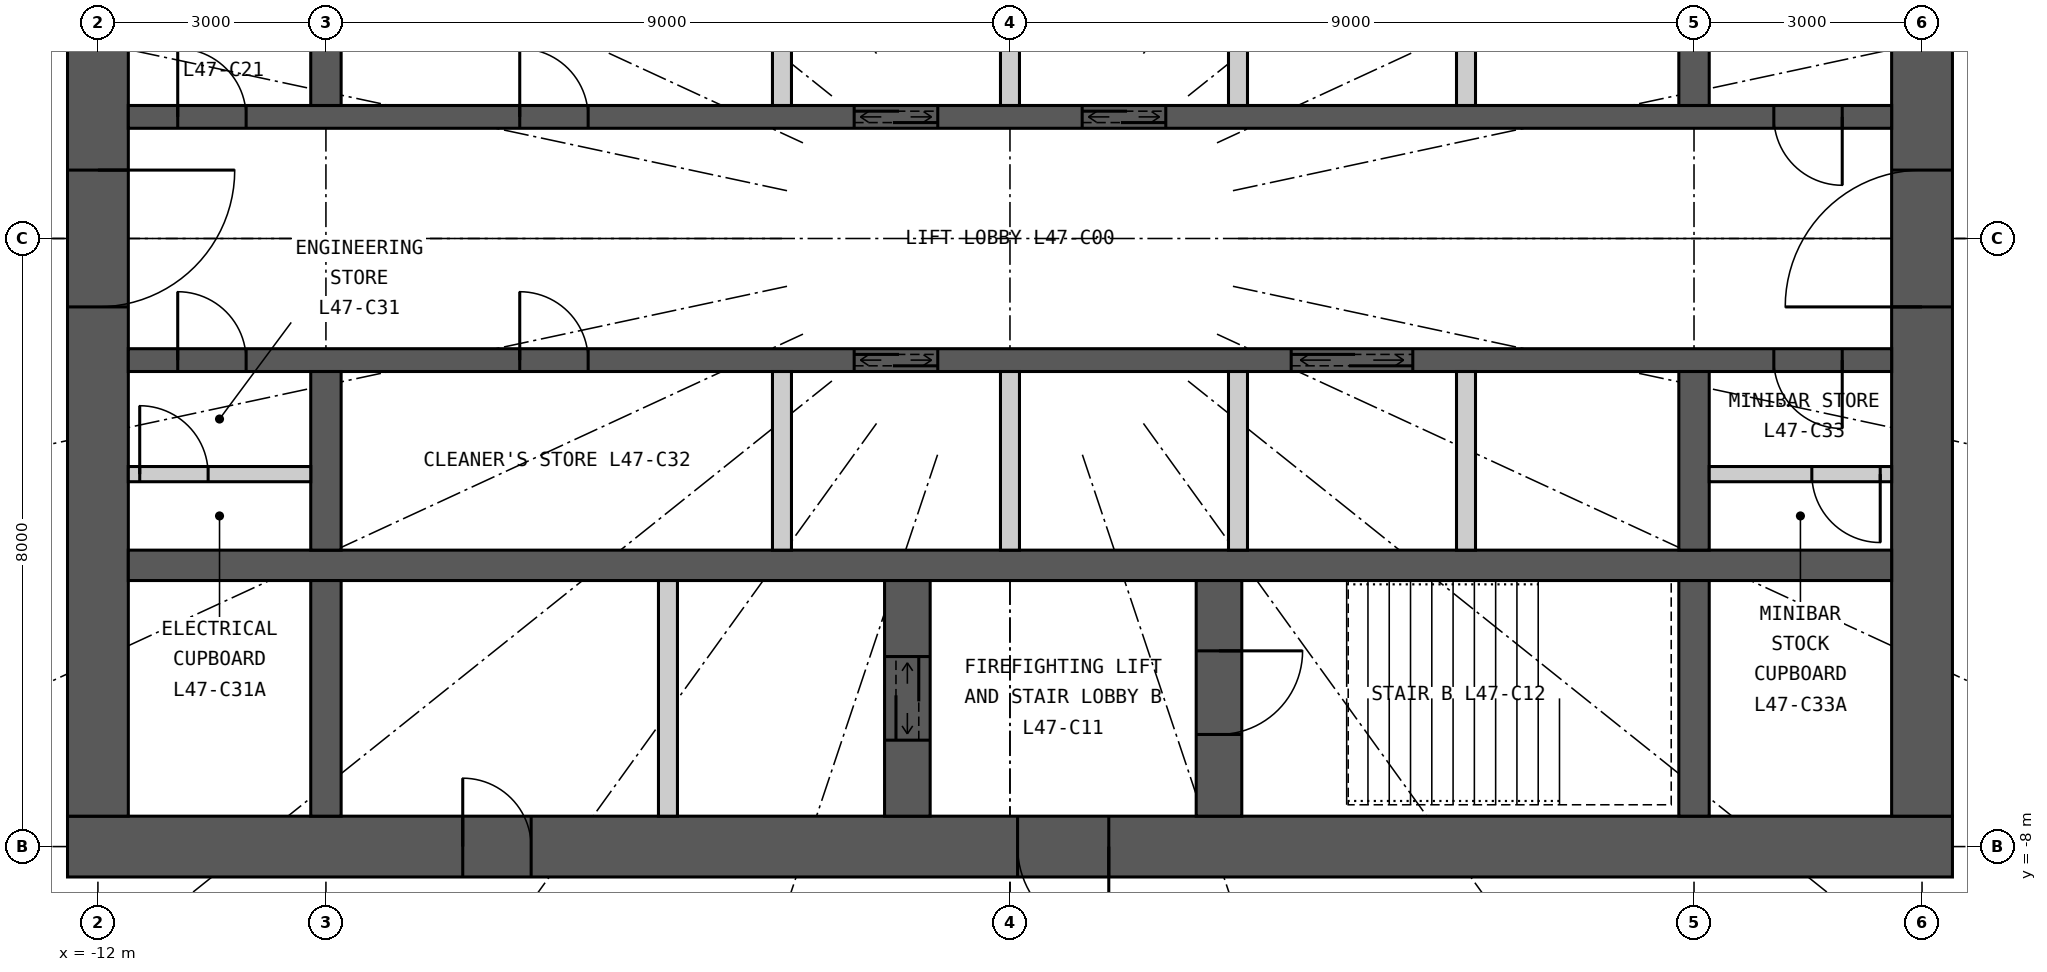
"""IFC4 building model, lengths in metres.
Left out: names, types, materials, properties, quantities, classifications, styles, units other than length and angle.
Written with IfcOpenShell. Run it as: python <this file> out.ifc"""

import sys

from ifc_helpers import new_model, si_unit, direction, frame, frame_2d, origin, place, context, subcontext, project, spatial, rectangle, extrude, element, fill, save


model = new_model("IFC4")
c1 = context("Model", 3, precision=1e-05, world=origin(), true_north=direction((0.0, 1.0)))
c2 = subcontext(c1, "Body", "Model", "MODEL_VIEW")
j1 = project(units=[si_unit("LENGTHUNIT", "METRE"), si_unit("PLANEANGLEUNIT", "RADIAN")], contexts=[c1])
p1 = place(None, origin())
s1 = spatial("IfcSite", under=j1, at=p1, CompositionType="ELEMENT")
p2 = place(p1, origin())
s2 = spatial("IfcBuilding", under=s1, at=p2, CompositionType="ELEMENT")
p3 = place(p2, frame((0.0, 0.0, 176.4)))
s3 = spatial("IfcBuildingStorey", under=s2, at=p3, CompositionType="ELEMENT", Elevation=176.4)
p4 = place(p3, frame((12.4, -8.0, 0.0), z_axis=(0.0, 0.0, 1.0), x_axis=(-1.0, 0.0, 0.0)))
e1 = element("IfcWall", 1, at=p4, inside=s3, PredefinedType="SHEAR", context=c2, shape_type="SweptSolid", body=[
    extrude(rectangle(XDim=24.8, YDim=0.8, at=frame_2d((12.4, 0.0))), origin(), (0.0, 0.0, 1.0), 3.3),
])
p5 = place(p4, frame((11.1, 0.0, 0.0)))
e2 = element("IfcOpeningElement", 2, at=p5, cuts=e1, PredefinedType="OPENING", context=c2, shape_type="SweptSolid", body=[
    extrude(rectangle(XDim=1.2, YDim=2.2, at=frame_2d((0.6, 1.1))), frame((0.0, 0.41, 0.0), z_axis=(0.0, -1.0, 0.0), x_axis=(1.0, 0.0, 0.0)), (0.0, 0.0, 1.0), 0.82),
])
p6 = place(p4, frame((18.7, 0.0, 0.0)))
e3 = element("IfcOpeningElement", 3, at=p6, cuts=e1, PredefinedType="OPENING", context=c2, shape_type="SweptSolid", body=[
    extrude(rectangle(XDim=0.9, YDim=2.2, at=frame_2d((0.45, 1.1))), frame((0.0, 0.41, 0.0), z_axis=(0.0, -1.0, 0.0), x_axis=(1.0, 0.0, 0.0)), (0.0, 0.0, 1.0), 0.82),
])
p7 = place(p3, frame((12.0, -7.6, 0.0), z_axis=(0.0, 0.0, 1.0), x_axis=(0.0, 1.0, 0.0)))
e4 = element("IfcWall", 4, at=p7, inside=s3, PredefinedType="SHEAR", context=c2, shape_type="SweptSolid", body=[
    extrude(rectangle(XDim=15.2, YDim=0.8, at=frame_2d((7.6, 0.0))), origin(), (0.0, 0.0, 1.0), 3.3),
])
p8 = place(p7, frame((6.7, 0.0, 0.0)))
e5 = element("IfcOpeningElement", 5, at=p8, cuts=e4, PredefinedType="OPENING", context=c2, shape_type="SweptSolid", body=[
    extrude(rectangle(XDim=1.8, YDim=2.2, at=frame_2d((0.9, 1.1))), frame((0.0, 0.41, 0.0), z_axis=(0.0, -1.0, 0.0), x_axis=(1.0, 0.0, 0.0)), (0.0, 0.0, 1.0), 0.82),
])
p9 = place(p3, frame((-12.0, 7.6, 0.0), z_axis=(0.0, 0.0, 1.0), x_axis=(0.0, -1.0, 0.0)))
e6 = element("IfcWall", 6, at=p9, inside=s3, PredefinedType="SHEAR", context=c2, shape_type="SweptSolid", body=[
    extrude(rectangle(XDim=15.2, YDim=0.8, at=frame_2d((7.6, 0.0))), origin(), (0.0, 0.0, 1.0), 3.3),
])
p10 = place(p9, frame((6.7, 0.0, 0.0)))
e7 = element("IfcOpeningElement", 7, at=p10, cuts=e6, PredefinedType="OPENING", context=c2, shape_type="SweptSolid", body=[
    extrude(rectangle(XDim=1.8, YDim=2.2, at=frame_2d((0.9, 1.1))), frame((0.0, 0.41, 0.0), z_axis=(0.0, -1.0, 0.0), x_axis=(1.0, 0.0, 0.0)), (0.0, 0.0, 1.0), 0.82),
])
p11 = place(p3, frame((-11.6, 1.6, 0.0), z_axis=(0.0, 0.0, 1.0), x_axis=(1.0, 0.0, 0.0)))
e8 = element("IfcWall", 8, at=p11, inside=s3, PredefinedType="SHEAR", context=c2, shape_type="SweptSolid", body=[
    extrude(rectangle(XDim=23.2, YDim=0.3, at=frame_2d((11.6, 0.0))), origin(), (0.0, 0.0, 1.0), 3.3),
])
p12 = place(p11, frame((9.55, 0.0, 0.0)))
e9 = element("IfcOpeningElement", 9, at=p12, cuts=e8, PredefinedType="OPENING", context=c2, shape_type="SweptSolid", body=[
    extrude(rectangle(XDim=1.1, YDim=2.2, at=frame_2d((0.55, 1.1))), frame((0.0, 0.16, 0.0), z_axis=(0.0, -1.0, 0.0), x_axis=(1.0, 0.0, 0.0)), (0.0, 0.0, 1.0), 0.32),
])
p13 = place(p11, frame((12.55, 0.0, 0.0)))
e10 = element("IfcOpeningElement", 10, at=p13, cuts=e8, PredefinedType="OPENING", context=c2, shape_type="SweptSolid", body=[
    extrude(rectangle(XDim=1.1, YDim=2.2, at=frame_2d((0.55, 1.1))), frame((0.0, 0.16, 0.0), z_axis=(0.0, -1.0, 0.0), x_axis=(1.0, 0.0, 0.0)), (0.0, 0.0, 1.0), 0.32),
])
p14 = place(p11, frame((0.65, 0.0, 0.0)))
e11 = element("IfcOpeningElement", 11, at=p14, cuts=e8, PredefinedType="OPENING", context=c2, shape_type="SweptSolid", body=[
    extrude(rectangle(XDim=0.9, YDim=2.2, at=frame_2d((0.45, 1.1))), frame((0.0, 0.16, 0.0), z_axis=(0.0, -1.0, 0.0), x_axis=(1.0, 0.0, 0.0)), (0.0, 0.0, 1.0), 0.32),
])
p15 = place(p11, frame((5.15, 0.0, 0.0)))
e12 = element("IfcOpeningElement", 12, at=p15, cuts=e8, PredefinedType="OPENING", context=c2, shape_type="SweptSolid", body=[
    extrude(rectangle(XDim=0.9, YDim=2.2, at=frame_2d((0.45, 1.1))), frame((0.0, 0.16, 0.0), z_axis=(0.0, -1.0, 0.0), x_axis=(1.0, 0.0, 0.0)), (0.0, 0.0, 1.0), 0.32),
])
p16 = place(p11, frame((21.65, 0.0, 0.0)))
e13 = element("IfcOpeningElement", 13, at=p16, cuts=e8, PredefinedType="OPENING", context=c2, shape_type="SweptSolid", body=[
    extrude(rectangle(XDim=0.9, YDim=2.2, at=frame_2d((0.45, 1.1))), frame((0.0, 0.16, 0.0), z_axis=(0.0, -1.0, 0.0), x_axis=(1.0, 0.0, 0.0)), (0.0, 0.0, 1.0), 0.32),
])
p17 = place(p3, frame((-11.6, -4.3, 0.0), z_axis=(0.0, 0.0, 1.0), x_axis=(1.0, 0.0, 0.0)))
e14 = element("IfcWall", 14, at=p17, inside=s3, PredefinedType="SHEAR", context=c2, shape_type="SweptSolid", body=[
    extrude(rectangle(XDim=23.2, YDim=0.4, at=frame_2d((11.6, 0.0))), origin(), (0.0, 0.0, 1.0), 3.3),
])
p18 = place(p3, frame((-11.6, -1.6, 0.0), z_axis=(0.0, 0.0, 1.0), x_axis=(1.0, 0.0, 0.0)))
e15 = element("IfcWall", 15, at=p18, inside=s3, PredefinedType="SHEAR", context=c2, shape_type="SweptSolid", body=[
    extrude(rectangle(XDim=23.2, YDim=0.3, at=frame_2d((11.6, 0.0))), origin(), (0.0, 0.0, 1.0), 3.3),
])
p19 = place(p18, frame((9.55, 0.0, 0.0)))
e16 = element("IfcOpeningElement", 16, at=p19, cuts=e15, PredefinedType="OPENING", context=c2, shape_type="SweptSolid", body=[
    extrude(rectangle(XDim=1.1, YDim=2.2, at=frame_2d((0.55, 1.1))), frame((0.0, 0.16, 0.0), z_axis=(0.0, -1.0, 0.0), x_axis=(1.0, 0.0, 0.0)), (0.0, 0.0, 1.0), 0.32),
])
p20 = place(p18, frame((15.3, 0.0, 0.0)))
e17 = element("IfcOpeningElement", 17, at=p20, cuts=e15, PredefinedType="OPENING", context=c2, shape_type="SweptSolid", body=[
    extrude(rectangle(XDim=1.6, YDim=2.4, at=frame_2d((0.8, 1.2))), frame((0.0, 0.16, 0.0), z_axis=(0.0, -1.0, 0.0), x_axis=(1.0, 0.0, 0.0)), (0.0, 0.0, 1.0), 0.32),
])
p21 = place(p18, frame((0.65, 0.0, 0.0)))
e18 = element("IfcOpeningElement", 18, at=p21, cuts=e15, PredefinedType="OPENING", context=c2, shape_type="SweptSolid", body=[
    extrude(rectangle(XDim=0.9, YDim=2.2, at=frame_2d((0.45, 1.1))), frame((0.0, 0.16, 0.0), z_axis=(0.0, -1.0, 0.0), x_axis=(1.0, 0.0, 0.0)), (0.0, 0.0, 1.0), 0.32),
])
p22 = place(p18, frame((5.15, 0.0, 0.0)))
e19 = element("IfcOpeningElement", 19, at=p22, cuts=e15, PredefinedType="OPENING", context=c2, shape_type="SweptSolid", body=[
    extrude(rectangle(XDim=0.9, YDim=2.2, at=frame_2d((0.45, 1.1))), frame((0.0, 0.16, 0.0), z_axis=(0.0, -1.0, 0.0), x_axis=(1.0, 0.0, 0.0)), (0.0, 0.0, 1.0), 0.32),
])
p23 = place(p18, frame((21.65, 0.0, 0.0)))
e20 = element("IfcOpeningElement", 20, at=p23, cuts=e15, PredefinedType="OPENING", context=c2, shape_type="SweptSolid", body=[
    extrude(rectangle(XDim=0.9, YDim=2.2, at=frame_2d((0.45, 1.1))), frame((0.0, 0.16, 0.0), z_axis=(0.0, -1.0, 0.0), x_axis=(1.0, 0.0, 0.0)), (0.0, 0.0, 1.0), 0.32),
])
for number, where, z_axis, x_axis in (
    (21, (-9.0, 1.75, 0.0), (0.0, 0.0, 1.0), (0.0, 1.0, 0.0)),
    (22, (-9.0, -4.1, 0.0), (0.0, 0.0, 1.0), (0.0, 1.0, 0.0)),
):
    element("IfcWall", number, at=place(p3, frame(where, z_axis=z_axis, x_axis=x_axis)), inside=s3, PredefinedType="SHEAR", context=c2, shape_type="SweptSolid", body=[
        extrude(rectangle(XDim=2.35, YDim=0.4, at=frame_2d((1.175, 0.0))), origin(), (0.0, 0.0, 1.0), 3.3),
    ])
p24 = place(p3, frame((-9.0, -7.6, 0.0), z_axis=(0.0, 0.0, 1.0), x_axis=(0.0, 1.0, 0.0)))
e23 = element("IfcWall", 23, at=p24, inside=s3, PredefinedType="SHEAR", context=c2, shape_type="SweptSolid", body=[
    extrude(rectangle(XDim=3.1, YDim=0.4, at=frame_2d((1.55, 0.0))), origin(), (0.0, 0.0, 1.0), 3.3),
])
for number, where, z_axis, x_axis in (
    (24, (9.0, 1.75, 0.0), (0.0, 0.0, 1.0), (0.0, 1.0, 0.0)),
    (25, (9.0, -4.1, 0.0), (0.0, 0.0, 1.0), (0.0, 1.0, 0.0)),
):
    element("IfcWall", number, at=place(p3, frame(where, z_axis=z_axis, x_axis=x_axis)), inside=s3, PredefinedType="SHEAR", context=c2, shape_type="SweptSolid", body=[
        extrude(rectangle(XDim=2.35, YDim=0.4, at=frame_2d((1.175, 0.0))), origin(), (0.0, 0.0, 1.0), 3.3),
    ])
p25 = place(p3, frame((9.0, -7.6, 0.0), z_axis=(0.0, 0.0, 1.0), x_axis=(0.0, 1.0, 0.0)))
e26 = element("IfcWall", 26, at=p25, inside=s3, PredefinedType="SHEAR", context=c2, shape_type="SweptSolid", body=[
    extrude(rectangle(XDim=3.1, YDim=0.4, at=frame_2d((1.55, 0.0))), origin(), (0.0, 0.0, 1.0), 3.3),
])
p26 = place(p3, frame((2.75, -7.6, 0.0), z_axis=(0.0, 0.0, 1.0), x_axis=(0.0, 1.0, 0.0)))
e27 = element("IfcWall", 27, at=p26, inside=s3, PredefinedType="SHEAR", context=c2, shape_type="SweptSolid", body=[
    extrude(rectangle(XDim=3.1, YDim=0.6, at=frame_2d((1.55, 0.0))), origin(), (0.0, 0.0, 1.0), 3.3),
])
p27 = place(p26, frame((1.075, 0.0, 0.0)))
e28 = element("IfcOpeningElement", 28, at=p27, cuts=e27, PredefinedType="OPENING", context=c2, shape_type="SweptSolid", body=[
    extrude(rectangle(XDim=1.1, YDim=2.2, at=frame_2d((0.55, 1.1))), frame((0.0, 0.31, 0.0), z_axis=(0.0, -1.0, 0.0), x_axis=(1.0, 0.0, 0.0)), (0.0, 0.0, 1.0), 0.62),
])
p28 = place(p3, frame((-1.35, -7.6, 0.0), z_axis=(0.0, 0.0, 1.0), x_axis=(0.0, 1.0, 0.0)))
e29 = element("IfcWall", 29, at=p28, inside=s3, PredefinedType="SHEAR", context=c2, shape_type="SweptSolid", body=[
    extrude(rectangle(XDim=3.1, YDim=0.6, at=frame_2d((1.55, 0.0))), origin(), (0.0, 0.0, 1.0), 3.3),
])
p29 = place(p28, frame((1.0, 0.0, 0.0)))
e30 = element("IfcOpeningElement", 30, at=p29, cuts=e29, PredefinedType="OPENING", context=c2, shape_type="SweptSolid", body=[
    extrude(rectangle(XDim=1.1, YDim=2.2, at=frame_2d((0.55, 1.1))), frame((0.0, 0.31, 0.0), z_axis=(0.0, -1.0, 0.0), x_axis=(1.0, 0.0, 0.0)), (0.0, 0.0, 1.0), 0.62),
])
p30 = place(p3, frame((-4.5, -7.6, 0.0), z_axis=(0.0, 0.0, 1.0), x_axis=(0.0, 1.0, 0.0)))
e31 = element("IfcWall", 31, at=p30, inside=s3, PredefinedType="PARTITIONING", context=c2, shape_type="SweptSolid", body=[
    extrude(rectangle(XDim=3.1, YDim=0.25, at=frame_2d((1.55, 0.0))), origin(), (0.0, 0.0, 1.0), 3.3),
])
for number, where, z_axis, x_axis in (
    (32, (-3.0, 1.75, 0.0), (0.0, 0.0, 1.0), (0.0, 1.0, 0.0)),
    (33, (0.0, 1.75, 0.0), (0.0, 0.0, 1.0), (0.0, 1.0, 0.0)),
    (34, (3.0, 1.75, 0.0), (0.0, 0.0, 1.0), (0.0, 1.0, 0.0)),
    (35, (6.0, 1.75, 0.0), (0.0, 0.0, 1.0), (0.0, 1.0, 0.0)),
    (36, (-3.0, -4.1, 0.0), (0.0, 0.0, 1.0), (0.0, 1.0, 0.0)),
    (37, (0.0, -4.1, 0.0), (0.0, 0.0, 1.0), (0.0, 1.0, 0.0)),
    (38, (3.0, -4.1, 0.0), (0.0, 0.0, 1.0), (0.0, 1.0, 0.0)),
    (39, (6.0, -4.1, 0.0), (0.0, 0.0, 1.0), (0.0, 1.0, 0.0)),
):
    element("IfcWall", number, at=place(p3, frame(where, z_axis=z_axis, x_axis=x_axis)), inside=s3, PredefinedType="PARTITIONING", context=c2, shape_type="SweptSolid", body=[
        extrude(rectangle(XDim=2.35, YDim=0.25, at=frame_2d((1.175, 0.0))), origin(), (0.0, 0.0, 1.0), 3.3),
    ])
p31 = place(p3, frame((-11.6, -3.1, 0.0), z_axis=(0.0, 0.0, 1.0), x_axis=(1.0, 0.0, 0.0)))
e40 = element("IfcWall", 40, at=p31, inside=s3, PredefinedType="PARTITIONING", context=c2, shape_type="SweptSolid", body=[
    extrude(rectangle(XDim=2.4, YDim=0.2, at=frame_2d((1.2, 0.0))), origin(), (0.0, 0.0, 1.0), 3.12),
])
p32 = place(p31, frame((0.15, 0.0, 0.0)))
e41 = element("IfcOpeningElement", 41, at=p32, cuts=e40, PredefinedType="OPENING", context=c2, shape_type="SweptSolid", body=[
    extrude(rectangle(XDim=0.9, YDim=2.2, at=frame_2d((0.45, 1.1))), frame((0.0, 0.11, 0.0), z_axis=(0.0, -1.0, 0.0), x_axis=(1.0, 0.0, 0.0)), (0.0, 0.0, 1.0), 0.22),
])
p33 = place(p3, frame((9.2, -3.1, 0.0), z_axis=(0.0, 0.0, 1.0), x_axis=(1.0, 0.0, 0.0)))
e42 = element("IfcWall", 42, at=p33, inside=s3, PredefinedType="PARTITIONING", context=c2, shape_type="SweptSolid", body=[
    extrude(rectangle(XDim=2.4, YDim=0.2, at=frame_2d((1.2, 0.0))), origin(), (0.0, 0.0, 1.0), 3.12),
])
p34 = place(p33, frame((1.35, 0.0, 0.0)))
e43 = element("IfcOpeningElement", 43, at=p34, cuts=e42, PredefinedType="OPENING", context=c2, shape_type="SweptSolid", body=[
    extrude(rectangle(XDim=0.9, YDim=2.2, at=frame_2d((0.45, 1.1))), frame((0.0, 0.11, 0.0), z_axis=(0.0, -1.0, 0.0), x_axis=(1.0, 0.0, 0.0)), (0.0, 0.0, 1.0), 0.22),
])
p35 = place(p5, origin())
e44 = element("IfcDoor", 44, at=p35, inside=s3, OperationType="SINGLE_SWING_LEFT", PredefinedType="DOOR", context=c2, shape_type="SweptSolid", body=[
    extrude(rectangle(XDim=1.2, YDim=2.2, at=frame_2d((0.6, 1.1))), frame((0.0, 0.025, 0.0), z_axis=(0.0, -1.0, 0.0), x_axis=(1.0, 0.0, 0.0)), (0.0, 0.0, 1.0), 0.05),
])
fill(e2, e44)
p36 = place(p27, origin())
e45 = element("IfcDoor", 45, at=p36, inside=s3, OperationType="SINGLE_SWING_RIGHT", PredefinedType="DOOR", context=c2, shape_type="SweptSolid", body=[
    extrude(rectangle(XDim=1.1, YDim=2.2, at=frame_2d((0.55, 1.1))), frame((0.0, 0.025, 0.0), z_axis=(0.0, -1.0, 0.0), x_axis=(1.0, 0.0, 0.0)), (0.0, 0.0, 1.0), 0.05),
])
fill(e28, e45)
p37 = place(p29, origin())
e46 = element("IfcDoor", 46, at=p37, inside=s3, OperationType="DOUBLE_DOOR_SLIDING", PredefinedType="DOOR", context=c2, shape_type="SweptSolid", body=[
    extrude(rectangle(XDim=1.1, YDim=2.2, at=frame_2d((0.55, 1.1))), frame((0.0, 0.025, 0.0), z_axis=(0.0, -1.0, 0.0), x_axis=(1.0, 0.0, 0.0)), (0.0, 0.0, 1.0), 0.05),
])
fill(e30, e46)
p38 = place(p6, origin())
e47 = element("IfcDoor", 47, at=p38, inside=s3, OperationType="SINGLE_SWING_RIGHT", PredefinedType="DOOR", context=c2, shape_type="SweptSolid", body=[
    extrude(rectangle(XDim=0.9, YDim=2.2, at=frame_2d((0.45, 1.1))), frame((0.0, 0.025, 0.0), z_axis=(0.0, -1.0, 0.0), x_axis=(1.0, 0.0, 0.0)), (0.0, 0.0, 1.0), 0.05),
])
fill(e3, e47)
p39 = place(p12, origin())
e48 = element("IfcDoor", 48, at=p39, inside=s3, OperationType="DOUBLE_DOOR_SLIDING", PredefinedType="DOOR", context=c2, shape_type="SweptSolid", body=[
    extrude(rectangle(XDim=1.1, YDim=2.2, at=frame_2d((0.55, 1.1))), frame((0.0, 0.025, 0.0), z_axis=(0.0, -1.0, 0.0), x_axis=(1.0, 0.0, 0.0)), (0.0, 0.0, 1.0), 0.05),
])
fill(e9, e48)
p40 = place(p13, origin())
e49 = element("IfcDoor", 49, at=p40, inside=s3, OperationType="DOUBLE_DOOR_SLIDING", PredefinedType="DOOR", context=c2, shape_type="SweptSolid", body=[
    extrude(rectangle(XDim=1.1, YDim=2.2, at=frame_2d((0.55, 1.1))), frame((0.0, 0.025, 0.0), z_axis=(0.0, -1.0, 0.0), x_axis=(1.0, 0.0, 0.0)), (0.0, 0.0, 1.0), 0.05),
])
fill(e10, e49)
p41 = place(p19, origin())
e50 = element("IfcDoor", 50, at=p41, inside=s3, OperationType="DOUBLE_DOOR_SLIDING", PredefinedType="DOOR", context=c2, shape_type="SweptSolid", body=[
    extrude(rectangle(XDim=1.1, YDim=2.2, at=frame_2d((0.55, 1.1))), frame((0.0, 0.025, 0.0), z_axis=(0.0, -1.0, 0.0), x_axis=(1.0, 0.0, 0.0)), (0.0, 0.0, 1.0), 0.05),
])
fill(e16, e50)
p42 = place(p20, origin())
e51 = element("IfcDoor", 51, at=p42, inside=s3, OperationType="DOUBLE_DOOR_SLIDING", PredefinedType="DOOR", context=c2, shape_type="SweptSolid", body=[
    extrude(rectangle(XDim=1.6, YDim=2.4, at=frame_2d((0.8, 1.2))), frame((0.0, 0.025, 0.0), z_axis=(0.0, -1.0, 0.0), x_axis=(1.0, 0.0, 0.0)), (0.0, 0.0, 1.0), 0.05),
])
fill(e17, e51)
p43 = place(p14, origin())
e52 = element("IfcDoor", 52, at=p43, inside=s3, OperationType="SINGLE_SWING_LEFT", PredefinedType="DOOR", context=c2, shape_type="SweptSolid", body=[
    extrude(rectangle(XDim=0.9, YDim=2.2, at=frame_2d((0.45, 1.1))), frame((0.0, 0.025, 0.0), z_axis=(0.0, -1.0, 0.0), x_axis=(1.0, 0.0, 0.0)), (0.0, 0.0, 1.0), 0.05),
])
fill(e11, e52)
p44 = place(p15, origin())
e53 = element("IfcDoor", 53, at=p44, inside=s3, OperationType="SINGLE_SWING_LEFT", PredefinedType="DOOR", context=c2, shape_type="SweptSolid", body=[
    extrude(rectangle(XDim=0.9, YDim=2.2, at=frame_2d((0.45, 1.1))), frame((0.0, 0.025, 0.0), z_axis=(0.0, -1.0, 0.0), x_axis=(1.0, 0.0, 0.0)), (0.0, 0.0, 1.0), 0.05),
])
fill(e12, e53)
p45 = place(p16, origin())
e54 = element("IfcDoor", 54, at=p45, inside=s3, OperationType="SINGLE_SWING_RIGHT", PredefinedType="DOOR", context=c2, shape_type="SweptSolid", body=[
    extrude(rectangle(XDim=0.9, YDim=2.2, at=frame_2d((0.45, 1.1))), frame((0.0, 0.025, 0.0), z_axis=(0.0, -1.0, 0.0), x_axis=(1.0, 0.0, 0.0)), (0.0, 0.0, 1.0), 0.05),
])
fill(e13, e54)
p46 = place(p32, origin())
e55 = element("IfcDoor", 55, at=p46, inside=s3, OperationType="SINGLE_SWING_LEFT", PredefinedType="DOOR", context=c2, shape_type="SweptSolid", body=[
    extrude(rectangle(XDim=0.9, YDim=2.2, at=frame_2d((0.45, 1.1))), frame((0.0, 0.025, 0.0), z_axis=(0.0, -1.0, 0.0), x_axis=(1.0, 0.0, 0.0)), (0.0, 0.0, 1.0), 0.05),
])
fill(e41, e55)
p47 = place(p21, origin())
e56 = element("IfcDoor", 56, at=p47, inside=s3, OperationType="SINGLE_SWING_LEFT", PredefinedType="DOOR", context=c2, shape_type="SweptSolid", body=[
    extrude(rectangle(XDim=0.9, YDim=2.2, at=frame_2d((0.45, 1.1))), frame((0.0, 0.025, 0.0), z_axis=(0.0, -1.0, 0.0), x_axis=(1.0, 0.0, 0.0)), (0.0, 0.0, 1.0), 0.05),
])
fill(e18, e56)
p48 = place(p22, origin())
e57 = element("IfcDoor", 57, at=p48, inside=s3, OperationType="SINGLE_SWING_LEFT", PredefinedType="DOOR", context=c2, shape_type="SweptSolid", body=[
    extrude(rectangle(XDim=0.9, YDim=2.2, at=frame_2d((0.45, 1.1))), frame((0.0, 0.025, 0.0), z_axis=(0.0, -1.0, 0.0), x_axis=(1.0, 0.0, 0.0)), (0.0, 0.0, 1.0), 0.05),
])
fill(e19, e57)
p49 = place(p34, origin())
e58 = element("IfcDoor", 58, at=p49, inside=s3, OperationType="SINGLE_SWING_RIGHT", PredefinedType="DOOR", context=c2, shape_type="SweptSolid", body=[
    extrude(rectangle(XDim=0.9, YDim=2.2, at=frame_2d((0.45, 1.1))), frame((0.0, 0.025, 0.0), z_axis=(0.0, -1.0, 0.0), x_axis=(1.0, 0.0, 0.0)), (0.0, 0.0, 1.0), 0.05),
])
fill(e43, e58)
p50 = place(p23, origin())
e59 = element("IfcDoor", 59, at=p50, inside=s3, OperationType="SINGLE_SWING_RIGHT", PredefinedType="DOOR", context=c2, shape_type="SweptSolid", body=[
    extrude(rectangle(XDim=0.9, YDim=2.2, at=frame_2d((0.45, 1.1))), frame((0.0, 0.025, 0.0), z_axis=(0.0, -1.0, 0.0), x_axis=(1.0, 0.0, 0.0)), (0.0, 0.0, 1.0), 0.05),
])
fill(e20, e59)
p51 = place(p8, origin())
e60 = element("IfcDoor", 60, at=p51, inside=s3, OperationType="DOUBLE_DOOR_DOUBLE_SWING", PredefinedType="DOOR", context=c2, shape_type="SweptSolid", body=[
    extrude(rectangle(XDim=1.8, YDim=2.2, at=frame_2d((0.9, 1.1))), frame((0.0, 0.025, 0.0), z_axis=(0.0, -1.0, 0.0), x_axis=(1.0, 0.0, 0.0)), (0.0, 0.0, 1.0), 0.05),
])
fill(e5, e60)
p52 = place(p10, origin())
e61 = element("IfcDoor", 61, at=p52, inside=s3, OperationType="DOUBLE_DOOR_DOUBLE_SWING", PredefinedType="DOOR", context=c2, shape_type="SweptSolid", body=[
    extrude(rectangle(XDim=1.8, YDim=2.2, at=frame_2d((0.9, 1.1))), frame((0.0, 0.025, 0.0), z_axis=(0.0, -1.0, 0.0), x_axis=(1.0, 0.0, 0.0)), (0.0, 0.0, 1.0), 0.05),
])
fill(e7, e61)
save(model, sys.argv[1])
